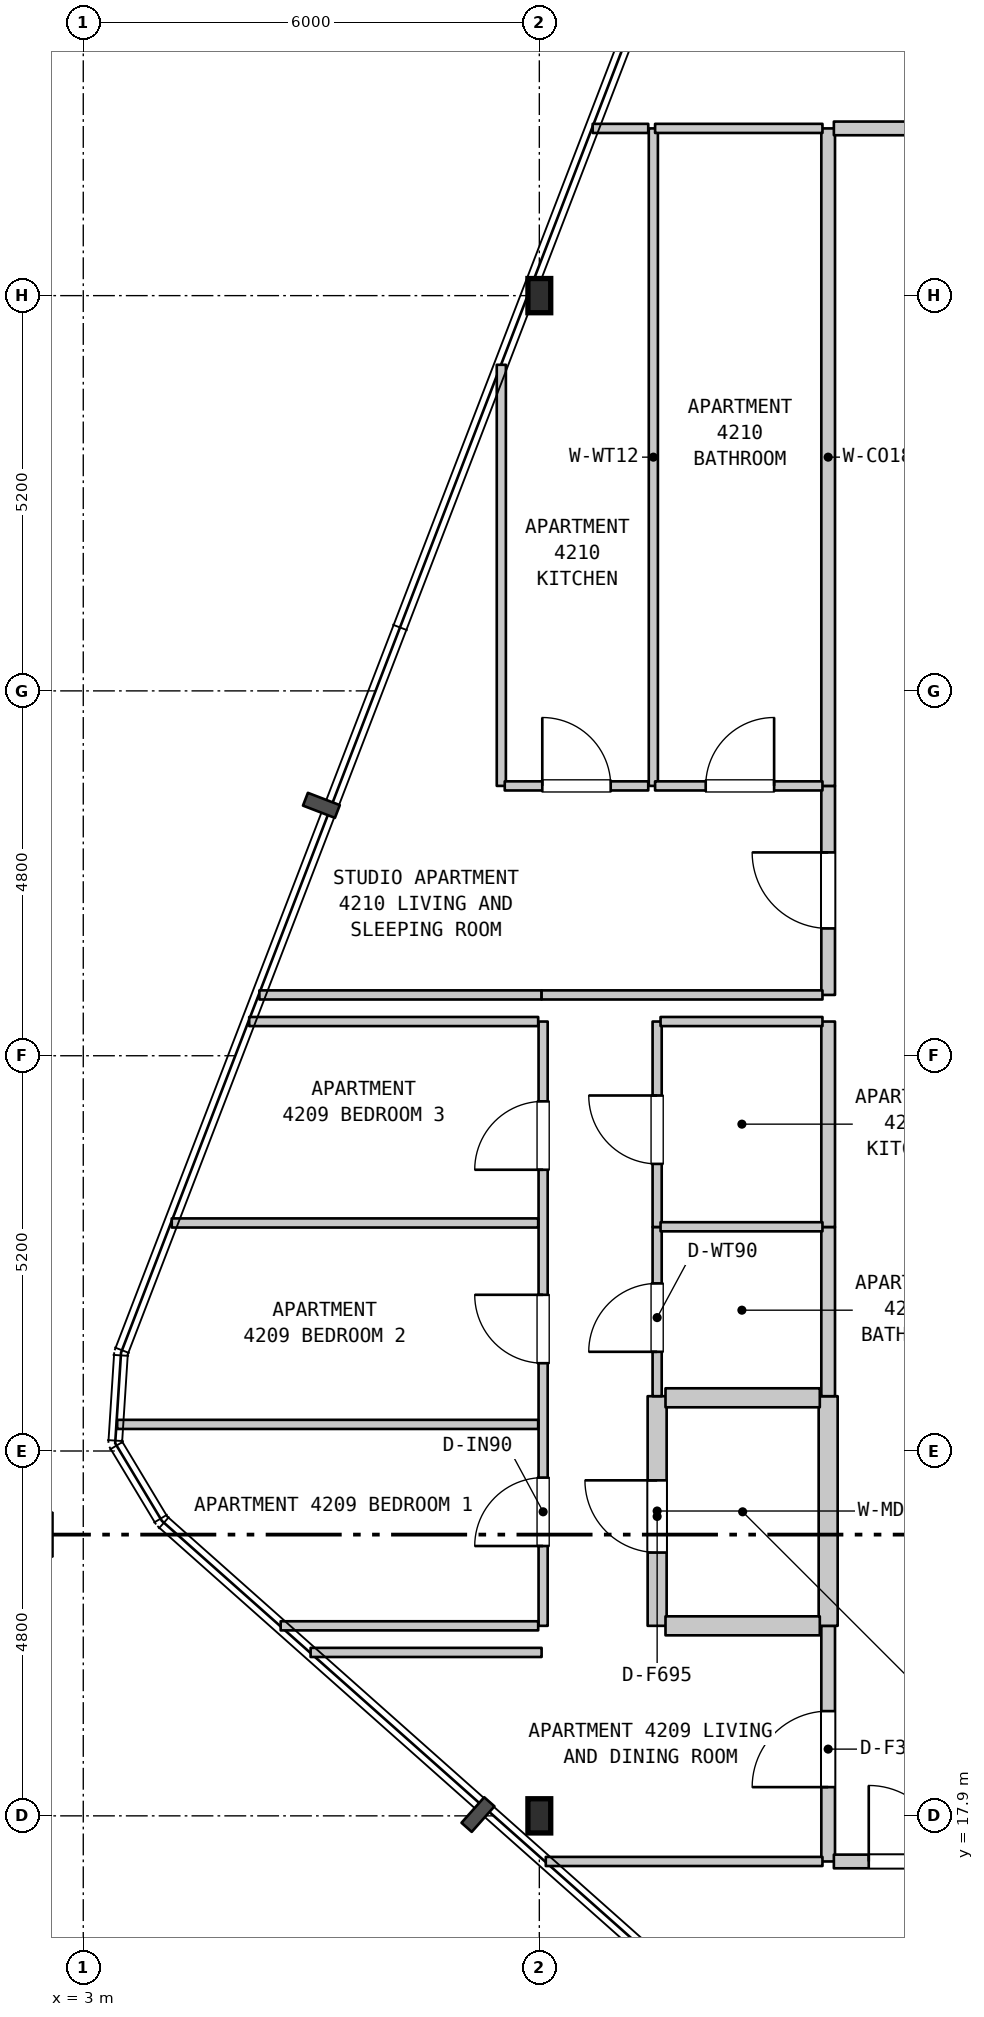
"""IFC4 building model, lengths in metres.
Left out: names, types, materials, properties, quantities, classifications, styles, units other than length and angle.
Written with IfcOpenShell. Run it as: python <this file> out.ifc"""

import sys

from ifc_helpers import new_model, si_unit, direction, frame, frame_2d, origin, origin_2d, place, context, subcontext, project, spatial, rectangle, i_section, extrude, element, fill, save


model = new_model("IFC4")
c1 = context("Model", 3, precision=1e-05, world=origin(), true_north=direction((0.0, 1.0)))
c2 = subcontext(c1, "Body", "Model", "MODEL_VIEW")
j1 = project(units=[si_unit("LENGTHUNIT", "METRE"), si_unit("PLANEANGLEUNIT", "RADIAN")], contexts=[c1])
p1 = place(None, origin())
s1 = spatial("IfcSite", under=j1, at=p1, CompositionType="ELEMENT")
p2 = place(p1, origin())
s2 = spatial("IfcBuilding", under=s1, at=p2, CompositionType="ELEMENT")
p3 = place(p2, frame((0.0, 0.0, 172.8)))
s3 = spatial("IfcBuildingStorey", under=s2, at=p3, CompositionType="ELEMENT", Elevation=172.8)
for number, where, z_axis, x_axis in (
    (1, (9.0, 17.9, 0.0), (0.0, 0.0, 1.0), (1.0, 0.0, 0.0)),
    (2, (9.0, 37.9, 0.0), (0.0, 0.0, 1.0), (1.0, 0.0, 0.0)),
):
    element("IfcColumn", number, at=place(p3, frame(where, z_axis=z_axis, x_axis=x_axis)), inside=s3, PredefinedType="COLUMN", context=c2, shape_type="SweptSolid", body=[
        extrude(i_section(OverallWidth=0.3, OverallDepth=0.45, WebThickness=0.014, FlangeThickness=0.026, FilletRadius=0.027, at=origin_2d()), origin(), (0.0, 0.0, 1.0), 3.7),
    ])
p4 = place(p3, frame((8.5, 31.45, 0.0), z_axis=(0.0, 0.0, 1.0), x_axis=(0.0, 1.0, 0.0)))
e3 = element("IfcWall", 3, at=p4, inside=s3, PredefinedType="PARTITIONING", context=c2, shape_type="SweptSolid", body=[
    extrude(rectangle(XDim=5.54, YDim=0.12, at=frame_2d((2.77, 0.0))), origin(), (0.0, 0.0, 1.0), 3.39),
])
p5 = place(p3, frame((9.05, 20.4, 0.0), z_axis=(0.0, 0.0, 1.0), x_axis=(0.0, 1.0, 0.0)))
e4 = element("IfcWall", 4, at=p5, inside=s3, PredefinedType="PARTITIONING", context=c2, shape_type="SweptSolid", body=[
    extrude(rectangle(XDim=7.95, YDim=0.12, at=frame_2d((3.975, 0.0))), origin(), (0.0, 0.0, 1.0), 2.79),
])
p6 = place(p5, frame((1.05, 0.0, 0.0)))
e5 = element("IfcOpeningElement", 5, at=p6, cuts=e4, PredefinedType="OPENING", context=c2, shape_type="SweptSolid", body=[
    extrude(rectangle(XDim=0.9, YDim=2.15, at=frame_2d((0.45, 1.075))), frame((0.0, 0.07, 0.0), z_axis=(0.0, -1.0, 0.0), x_axis=(1.0, 0.0, 0.0)), (0.0, 0.0, 1.0), 0.14),
])
p7 = place(p5, frame((3.455, 0.0, 0.0)))
e6 = element("IfcOpeningElement", 6, at=p7, cuts=e4, PredefinedType="OPENING", context=c2, shape_type="SweptSolid", body=[
    extrude(rectangle(XDim=0.9, YDim=2.15, at=frame_2d((0.45, 1.075))), frame((0.0, 0.07, 0.0), z_axis=(0.0, -1.0, 0.0), x_axis=(1.0, 0.0, 0.0)), (0.0, 0.0, 1.0), 0.14),
])
p8 = place(p5, frame((6.0, 0.0, 0.0)))
e7 = element("IfcOpeningElement", 7, at=p8, cuts=e4, PredefinedType="OPENING", context=c2, shape_type="SweptSolid", body=[
    extrude(rectangle(XDim=0.9, YDim=2.15, at=frame_2d((0.45, 1.075))), frame((0.0, 0.07, 0.0), z_axis=(0.0, -1.0, 0.0), x_axis=(1.0, 0.0, 0.0)), (0.0, 0.0, 1.0), 0.14),
])
p9 = place(p3, frame((10.5, 31.45, 0.0), z_axis=(0.0, 0.0, 1.0), x_axis=(0.0, 1.0, 0.0)))
e8 = element("IfcWall", 8, at=p9, inside=s3, PredefinedType="PARTITIONING", context=c2, shape_type="SweptSolid", body=[
    extrude(rectangle(XDim=8.65, YDim=0.12, at=frame_2d((4.325, 0.0))), origin(), (0.0, 0.0, 1.0), 3.39),
])
p10 = place(p3, frame((10.55, 20.4, 0.0), z_axis=(0.0, 0.0, 1.0), x_axis=(0.0, 1.0, 0.0)))
e9 = element("IfcWall", 9, at=p10, inside=s3, PredefinedType="STANDARD", context=c2, shape_type="SweptSolid", body=[
    extrude(rectangle(XDim=3.021, YDim=0.25, at=frame_2d((1.51, 0.0))), origin(), (0.0, 0.0, 1.0), 3.39),
])
p11 = place(p10, frame((0.964, 0.0, 0.0)))
e10 = element("IfcOpeningElement", 10, at=p11, cuts=e9, PredefinedType="OPENING", context=c2, shape_type="SweptSolid", body=[
    extrude(rectangle(XDim=0.95, YDim=2.15, at=frame_2d((0.475, 1.075))), frame((0.0, 0.135, 0.0), z_axis=(0.0, -1.0, 0.0), x_axis=(1.0, 0.0, 0.0)), (0.0, 0.0, 1.0), 0.27),
])
p12 = place(p3, frame((10.55, 23.421, 0.0), z_axis=(0.0, 0.0, 1.0), x_axis=(0.0, 1.0, 0.0)))
e11 = element("IfcWall", 11, at=p12, inside=s3, PredefinedType="PARTITIONING", context=c2, shape_type="SweptSolid", body=[
    extrude(rectangle(XDim=2.226, YDim=0.12, at=frame_2d((1.113, 0.0))), origin(), (0.0, 0.0, 1.0), 3.39),
])
p13 = place(p12, frame((0.584, 0.0, 0.0)))
e12 = element("IfcOpeningElement", 12, at=p13, cuts=e11, PredefinedType="OPENING", context=c2, shape_type="SweptSolid", body=[
    extrude(rectangle(XDim=0.9, YDim=2.1, at=frame_2d((0.45, 1.05))), frame((0.0, 0.07, 0.0), z_axis=(0.0, -1.0, 0.0), x_axis=(1.0, 0.0, 0.0)), (0.0, 0.0, 1.0), 0.14),
])
p14 = place(p3, frame((10.55, 25.647, 0.0), z_axis=(0.0, 0.0, 1.0), x_axis=(0.0, 1.0, 0.0)))
e13 = element("IfcWall", 13, at=p14, inside=s3, PredefinedType="PARTITIONING", context=c2, shape_type="SweptSolid", body=[
    extrude(rectangle(XDim=2.703, YDim=0.12, at=frame_2d((1.352, 0.0))), origin(), (0.0, 0.0, 1.0), 3.39),
])
p15 = place(p14, frame((0.83, 0.0, 0.0)))
e14 = element("IfcOpeningElement", 14, at=p15, cuts=e13, PredefinedType="OPENING", context=c2, shape_type="SweptSolid", body=[
    extrude(rectangle(XDim=0.9, YDim=2.15, at=frame_2d((0.45, 1.075))), frame((0.0, 0.07, 0.0), z_axis=(0.0, -1.0, 0.0), x_axis=(1.0, 0.0, 0.0)), (0.0, 0.0, 1.0), 0.14),
])
p16 = place(p3, frame((12.8, 17.3, 0.0), z_axis=(0.0, 0.0, 1.0), x_axis=(0.0, 1.0, 0.0)))
e15 = element("IfcWall", 15, at=p16, inside=s3, PredefinedType="STANDARD", context=c2, shape_type="SweptSolid", body=[
    extrude(rectangle(XDim=3.1, YDim=0.18, at=frame_2d((1.55, 0.0))), origin(), (0.0, 0.0, 1.0), 3.39),
])
p17 = place(p16, frame((0.978, 0.0, 0.0)))
e16 = element("IfcOpeningElement", 16, at=p17, cuts=e15, PredefinedType="OPENING", context=c2, shape_type="SweptSolid", body=[
    extrude(rectangle(XDim=1.0, YDim=2.15, at=frame_2d((0.5, 1.075))), frame((0.0, 0.1, 0.0), z_axis=(0.0, -1.0, 0.0), x_axis=(1.0, 0.0, 0.0)), (0.0, 0.0, 1.0), 0.2),
])
p18 = place(p3, frame((12.8, 20.4, 0.0), z_axis=(0.0, 0.0, 1.0), x_axis=(0.0, 1.0, 0.0)))
e17 = element("IfcWall", 17, at=p18, inside=s3, PredefinedType="STANDARD", context=c2, shape_type="SweptSolid", body=[
    extrude(rectangle(XDim=3.021, YDim=0.25, at=frame_2d((1.51, 0.0))), origin(), (0.0, 0.0, 1.0), 3.39),
])
p19 = place(p3, frame((12.8, 23.421, 0.0), z_axis=(0.0, 0.0, 1.0), x_axis=(0.0, 1.0, 0.0)))
e18 = element("IfcWall", 18, at=p19, inside=s3, PredefinedType="STANDARD", context=c2, shape_type="SweptSolid", body=[
    extrude(rectangle(XDim=2.226, YDim=0.18, at=frame_2d((1.113, 0.0))), origin(), (0.0, 0.0, 1.0), 3.39),
])
p20 = place(p3, frame((12.8, 25.647, 0.0), z_axis=(0.0, 0.0, 1.0), x_axis=(0.0, 1.0, 0.0)))
e19 = element("IfcWall", 19, at=p20, inside=s3, PredefinedType="STANDARD", context=c2, shape_type="SweptSolid", body=[
    extrude(rectangle(XDim=2.703, YDim=0.18, at=frame_2d((1.352, 0.0))), origin(), (0.0, 0.0, 1.0), 3.39),
])
p21 = place(p3, frame((12.8, 28.7, 0.0), z_axis=(0.0, 0.0, 1.0), x_axis=(0.0, 1.0, 0.0)))
e20 = element("IfcWall", 20, at=p21, inside=s3, PredefinedType="STANDARD", context=c2, shape_type="SweptSolid", body=[
    extrude(rectangle(XDim=2.75, YDim=0.18, at=frame_2d((1.375, 0.0))), origin(), (0.0, 0.0, 1.0), 3.39),
])
p22 = place(p21, frame((0.875, 0.0, 0.0)))
e21 = element("IfcOpeningElement", 21, at=p22, cuts=e20, PredefinedType="OPENING", context=c2, shape_type="SweptSolid", body=[
    extrude(rectangle(XDim=1.0, YDim=2.15, at=frame_2d((0.5, 1.075))), frame((0.0, 0.1, 0.0), z_axis=(0.0, -1.0, 0.0), x_axis=(1.0, 0.0, 0.0)), (0.0, 0.0, 1.0), 0.2),
])
p23 = place(p3, frame((12.8, 31.45, 0.0), z_axis=(0.0, 0.0, 1.0), x_axis=(0.0, 1.0, 0.0)))
e22 = element("IfcWall", 22, at=p23, inside=s3, PredefinedType="STANDARD", context=c2, shape_type="SweptSolid", body=[
    extrude(rectangle(XDim=8.65, YDim=0.18, at=frame_2d((4.325, 0.0))), origin(), (0.0, 0.0, 1.0), 3.39),
])
p24 = place(p3, frame((9.085, 17.3, 0.0), z_axis=(0.0, 0.0, 1.0), x_axis=(1.0, 0.0, 0.0)))
e23 = element("IfcWall", 23, at=p24, inside=s3, PredefinedType="PARTITIONING", context=c2, shape_type="SweptSolid", body=[
    extrude(rectangle(XDim=3.64, YDim=0.12, at=frame_2d((1.82, 0.0))), origin(), (0.0, 0.0, 1.0), 3.39),
])
p25 = place(p3, frame((12.875, 17.3, 0.0), z_axis=(0.0, 0.0, 1.0), x_axis=(1.0, 0.0, 0.0)))
e24 = element("IfcWall", 24, at=p25, inside=s3, PredefinedType="STANDARD", context=c2, shape_type="SweptSolid", body=[
    extrude(rectangle(XDim=3.5, YDim=0.18, at=frame_2d((1.75, 0.0))), origin(), (0.0, 0.0, 1.0), 3.39),
])
p26 = place(p25, frame((0.459, 0.0, 0.0)))
e25 = element("IfcOpeningElement", 25, at=p26, cuts=e24, PredefinedType="OPENING", context=c2, shape_type="SweptSolid", body=[
    extrude(rectangle(XDim=1.0, YDim=2.15, at=frame_2d((0.5, 1.075))), frame((0.0, 0.1, 0.0), z_axis=(0.0, -1.0, 0.0), x_axis=(1.0, 0.0, 0.0)), (0.0, 0.0, 1.0), 0.2),
])
p27 = place(p3, frame((5.991, 20.05, 0.0), z_axis=(0.0, 0.0, 1.0), x_axis=(1.0, 0.0, 0.0)))
e26 = element("IfcWall", 26, at=p27, inside=s3, PredefinedType="PARTITIONING", context=c2, shape_type="SweptSolid", body=[
    extrude(rectangle(XDim=3.039, YDim=0.12, at=frame_2d((1.52, 0.0))), origin(), (0.0, 0.0, 1.0), 3.39),
])
p28 = place(p3, frame((5.597, 20.4, 0.0), z_axis=(0.0, 0.0, 1.0), x_axis=(1.0, 0.0, 0.0)))
e27 = element("IfcWall", 27, at=p28, inside=s3, PredefinedType="PARTITIONING", context=c2, shape_type="SweptSolid", body=[
    extrude(rectangle(XDim=3.388, YDim=0.12, at=frame_2d((1.694, 0.0))), origin(), (0.0, 0.0, 1.0), 3.39),
])
p29 = place(p3, frame((10.66, 20.4, 0.0), z_axis=(0.0, 0.0, 1.0), x_axis=(1.0, 0.0, 0.0)))
e28 = element("IfcWall", 28, at=p29, inside=s3, PredefinedType="STANDARD", context=c2, shape_type="SweptSolid", body=[
    extrude(rectangle(XDim=2.03, YDim=0.25, at=frame_2d((1.015, 0.0))), origin(), (0.0, 0.0, 1.0), 3.39),
])
p30 = place(p3, frame((3.446, 23.05, 0.0), z_axis=(0.0, 0.0, 1.0), x_axis=(1.0, 0.0, 0.0)))
e29 = element("IfcWall", 29, at=p30, inside=s3, PredefinedType="PARTITIONING", context=c2, shape_type="SweptSolid", body=[
    extrude(rectangle(XDim=5.539, YDim=0.12, at=frame_2d((2.77, 0.0))), origin(), (0.0, 0.0, 1.0), 3.39),
])
p31 = place(p3, frame((10.66, 23.4, 0.0), z_axis=(0.0, 0.0, 1.0), x_axis=(1.0, 0.0, 0.0)))
e30 = element("IfcWall", 30, at=p31, inside=s3, PredefinedType="STANDARD", context=c2, shape_type="SweptSolid", body=[
    extrude(rectangle(XDim=2.03, YDim=0.25, at=frame_2d((1.015, 0.0))), origin(), (0.0, 0.0, 1.0), 3.39),
])
p32 = place(p3, frame((10.595, 25.65, 0.0), z_axis=(0.0, 0.0, 1.0), x_axis=(1.0, 0.0, 0.0)))
e31 = element("IfcWall", 31, at=p32, inside=s3, PredefinedType="PARTITIONING", context=c2, shape_type="SweptSolid", body=[
    extrude(rectangle(XDim=2.13, YDim=0.12, at=frame_2d((1.065, 0.0))), origin(), (0.0, 0.0, 1.0), 3.39),
])
p33 = place(p3, frame((4.164, 25.7, 0.0), z_axis=(0.0, 0.0, 1.0), x_axis=(1.0, 0.0, 0.0)))
e32 = element("IfcWall", 32, at=p33, inside=s3, PredefinedType="PARTITIONING", context=c2, shape_type="SweptSolid", body=[
    extrude(rectangle(XDim=4.821, YDim=0.12, at=frame_2d((2.411, 0.0))), origin(), (0.0, 0.0, 1.0), 3.39),
])
p34 = place(p3, frame((5.183, 28.35, 0.0), z_axis=(0.0, 0.0, 1.0), x_axis=(1.0, 0.0, 0.0)))
e33 = element("IfcWall", 33, at=p34, inside=s3, PredefinedType="PARTITIONING", context=c2, shape_type="SweptSolid", body=[
    extrude(rectangle(XDim=3.802, YDim=0.12, at=frame_2d((1.901, 0.0))), origin(), (0.0, 0.0, 1.0), 3.39),
])
p35 = place(p3, frame((10.595, 28.35, 0.0), z_axis=(0.0, 0.0, 1.0), x_axis=(1.0, 0.0, 0.0)))
e34 = element("IfcWall", 34, at=p35, inside=s3, PredefinedType="PARTITIONING", context=c2, shape_type="SweptSolid", body=[
    extrude(rectangle(XDim=2.13, YDim=0.12, at=frame_2d((1.065, 0.0))), origin(), (0.0, 0.0, 1.0), 3.39),
])
p36 = place(p3, frame((5.317, 28.7, 0.0), z_axis=(0.0, 0.0, 1.0), x_axis=(1.0, 0.0, 0.0)))
e35 = element("IfcWall", 35, at=p36, inside=s3, PredefinedType="PARTITIONING", context=c2, shape_type="SweptSolid", body=[
    extrude(rectangle(XDim=3.713, YDim=0.12, at=frame_2d((1.856, 0.0))), origin(), (0.0, 0.0, 1.0), 3.39),
])
p37 = place(p3, frame((9.03, 28.7, 0.0), z_axis=(0.0, 0.0, 1.0), x_axis=(1.0, 0.0, 0.0)))
e36 = element("IfcWall", 36, at=p37, inside=s3, PredefinedType="PARTITIONING", context=c2, shape_type="SweptSolid", body=[
    extrude(rectangle(XDim=3.695, YDim=0.12, at=frame_2d((1.848, 0.0))), origin(), (0.0, 0.0, 1.0), 3.39),
])
p38 = place(p3, frame((8.545, 31.45, 0.0), z_axis=(0.0, 0.0, 1.0), x_axis=(1.0, 0.0, 0.0)))
e37 = element("IfcWall", 37, at=p38, inside=s3, PredefinedType="PARTITIONING", context=c2, shape_type="SweptSolid", body=[
    extrude(rectangle(XDim=1.888, YDim=0.12, at=frame_2d((0.944, 0.0))), origin(), (0.0, 0.0, 1.0), 3.39),
])
p39 = place(p38, frame((0.494, 0.0, 0.0)))
e38 = element("IfcOpeningElement", 38, at=p39, cuts=e37, PredefinedType="OPENING", context=c2, shape_type="SweptSolid", body=[
    extrude(rectangle(XDim=0.9, YDim=2.15, at=frame_2d((0.45, 1.075))), frame((0.0, 0.07, 0.0), z_axis=(0.0, -1.0, 0.0), x_axis=(1.0, 0.0, 0.0)), (0.0, 0.0, 1.0), 0.14),
])
p40 = place(p3, frame((10.523, 31.45, 0.0), z_axis=(0.0, 0.0, 1.0), x_axis=(1.0, 0.0, 0.0)))
e39 = element("IfcWall", 39, at=p40, inside=s3, PredefinedType="PARTITIONING", context=c2, shape_type="SweptSolid", body=[
    extrude(rectangle(XDim=2.202, YDim=0.12, at=frame_2d((1.101, 0.0))), origin(), (0.0, 0.0, 1.0), 3.39),
])
p41 = place(p40, frame((0.666, 0.0, 0.0)))
e40 = element("IfcOpeningElement", 40, at=p41, cuts=e39, PredefinedType="OPENING", context=c2, shape_type="SweptSolid", body=[
    extrude(rectangle(XDim=0.9, YDim=2.1, at=frame_2d((0.45, 1.05))), frame((0.0, 0.07, 0.0), z_axis=(0.0, -1.0, 0.0), x_axis=(1.0, 0.0, 0.0)), (0.0, 0.0, 1.0), 0.14),
])
p42 = place(p3, frame((9.702, 40.1, 0.0), z_axis=(0.0, 0.0, 1.0), x_axis=(1.0, 0.0, 0.0)))
e41 = element("IfcWall", 41, at=p42, inside=s3, PredefinedType="PARTITIONING", context=c2, shape_type="SweptSolid", body=[
    extrude(rectangle(XDim=0.731, YDim=0.12, at=frame_2d((0.366, 0.0))), origin(), (0.0, 0.0, 1.0), 3.39),
])
p43 = place(p3, frame((10.523, 40.1, 0.0), z_axis=(0.0, 0.0, 1.0), x_axis=(1.0, 0.0, 0.0)))
e42 = element("IfcWall", 42, at=p43, inside=s3, PredefinedType="PARTITIONING", context=c2, shape_type="SweptSolid", body=[
    extrude(rectangle(XDim=2.202, YDim=0.12, at=frame_2d((1.101, 0.0))), origin(), (0.0, 0.0, 1.0), 3.39),
])
p44 = place(p3, frame((12.875, 40.1, 0.0), z_axis=(0.0, 0.0, 1.0), x_axis=(1.0, 0.0, 0.0)))
e43 = element("IfcWall", 43, at=p44, inside=s3, PredefinedType="STANDARD", context=c2, shape_type="SweptSolid", body=[
    extrude(rectangle(XDim=1.33, YDim=0.18, at=frame_2d((0.665, 0.0))), origin(), (0.0, 0.0, 1.0), 3.39),
])
p45 = place(p6, origin())
e44 = element("IfcDoor", 44, at=p45, inside=s3, OperationType="SINGLE_SWING_LEFT", PredefinedType="DOOR", context=c2, shape_type="SweptSolid", body=[
    extrude(rectangle(XDim=0.9, YDim=2.15, at=frame_2d((0.45, 1.075))), frame((0.0, 0.025, 0.0), z_axis=(0.0, -1.0, 0.0), x_axis=(1.0, 0.0, 0.0)), (0.0, 0.0, 1.0), 0.05),
])
fill(e5, e44)
p46 = place(p7, origin())
e45 = element("IfcDoor", 45, at=p46, inside=s3, OperationType="SINGLE_SWING_RIGHT", PredefinedType="DOOR", context=c2, shape_type="SweptSolid", body=[
    extrude(rectangle(XDim=0.9, YDim=2.15, at=frame_2d((0.45, 1.075))), frame((0.0, 0.025, 0.0), z_axis=(0.0, -1.0, 0.0), x_axis=(1.0, 0.0, 0.0)), (0.0, 0.0, 1.0), 0.05),
])
fill(e6, e45)
p47 = place(p8, origin())
e46 = element("IfcDoor", 46, at=p47, inside=s3, OperationType="SINGLE_SWING_LEFT", PredefinedType="DOOR", context=c2, shape_type="SweptSolid", body=[
    extrude(rectangle(XDim=0.9, YDim=2.15, at=frame_2d((0.45, 1.075))), frame((0.0, 0.025, 0.0), z_axis=(0.0, -1.0, 0.0), x_axis=(1.0, 0.0, 0.0)), (0.0, 0.0, 1.0), 0.05),
])
fill(e7, e46)
p48 = place(p11, origin())
e47 = element("IfcDoor", 47, at=p48, inside=s3, OperationType="SINGLE_SWING_RIGHT", PredefinedType="DOOR", context=c2, shape_type="SweptSolid", body=[
    extrude(rectangle(XDim=0.95, YDim=2.15, at=frame_2d((0.475, 1.075))), frame((0.0, 0.025, 0.0), z_axis=(0.0, -1.0, 0.0), x_axis=(1.0, 0.0, 0.0)), (0.0, 0.0, 1.0), 0.05),
])
fill(e10, e47)
p49 = place(p13, origin())
e48 = element("IfcDoor", 48, at=p49, inside=s3, OperationType="SINGLE_SWING_LEFT", PredefinedType="DOOR", context=c2, shape_type="SweptSolid", body=[
    extrude(rectangle(XDim=0.9, YDim=2.1, at=frame_2d((0.45, 1.05))), frame((0.0, 0.025, 0.0), z_axis=(0.0, -1.0, 0.0), x_axis=(1.0, 0.0, 0.0)), (0.0, 0.0, 1.0), 0.05),
])
fill(e12, e48)
p50 = place(p15, origin())
e49 = element("IfcDoor", 49, at=p50, inside=s3, OperationType="SINGLE_SWING_RIGHT", PredefinedType="DOOR", context=c2, shape_type="SweptSolid", body=[
    extrude(rectangle(XDim=0.9, YDim=2.15, at=frame_2d((0.45, 1.075))), frame((0.0, 0.025, 0.0), z_axis=(0.0, -1.0, 0.0), x_axis=(1.0, 0.0, 0.0)), (0.0, 0.0, 1.0), 0.05),
])
fill(e14, e49)
p51 = place(p17, origin())
e50 = element("IfcDoor", 50, at=p51, inside=s3, OperationType="SINGLE_SWING_LEFT", PredefinedType="DOOR", context=c2, shape_type="SweptSolid", body=[
    extrude(rectangle(XDim=1.0, YDim=2.15, at=frame_2d((0.5, 1.075))), frame((0.0, 0.025, 0.0), z_axis=(0.0, -1.0, 0.0), x_axis=(1.0, 0.0, 0.0)), (0.0, 0.0, 1.0), 0.05),
])
fill(e16, e50)
p52 = place(p22, origin())
e51 = element("IfcDoor", 51, at=p52, inside=s3, OperationType="SINGLE_SWING_RIGHT", PredefinedType="DOOR", context=c2, shape_type="SweptSolid", body=[
    extrude(rectangle(XDim=1.0, YDim=2.15, at=frame_2d((0.5, 1.075))), frame((0.0, 0.025, 0.0), z_axis=(0.0, -1.0, 0.0), x_axis=(1.0, 0.0, 0.0)), (0.0, 0.0, 1.0), 0.05),
])
fill(e21, e51)
p53 = place(p26, origin())
e52 = element("IfcDoor", 52, at=p53, inside=s3, OperationType="SINGLE_SWING_LEFT", PredefinedType="DOOR", context=c2, shape_type="SweptSolid", body=[
    extrude(rectangle(XDim=1.0, YDim=2.15, at=frame_2d((0.5, 1.075))), frame((0.0, 0.025, 0.0), z_axis=(0.0, -1.0, 0.0), x_axis=(1.0, 0.0, 0.0)), (0.0, 0.0, 1.0), 0.05),
])
fill(e25, e52)
p54 = place(p39, origin())
e53 = element("IfcDoor", 53, at=p54, inside=s3, OperationType="SINGLE_SWING_LEFT", PredefinedType="DOOR", context=c2, shape_type="SweptSolid", body=[
    extrude(rectangle(XDim=0.9, YDim=2.15, at=frame_2d((0.45, 1.075))), frame((0.0, 0.025, 0.0), z_axis=(0.0, -1.0, 0.0), x_axis=(1.0, 0.0, 0.0)), (0.0, 0.0, 1.0), 0.05),
])
fill(e38, e53)
p55 = place(p41, origin())
e54 = element("IfcDoor", 54, at=p55, inside=s3, OperationType="SINGLE_SWING_RIGHT", PredefinedType="DOOR", context=c2, shape_type="SweptSolid", body=[
    extrude(rectangle(XDim=0.9, YDim=2.1, at=frame_2d((0.45, 1.05))), frame((0.0, 0.025, 0.0), z_axis=(0.0, -1.0, 0.0), x_axis=(1.0, 0.0, 0.0)), (0.0, 0.0, 1.0), 0.05),
])
fill(e40, e54)
save(model, sys.argv[1])
